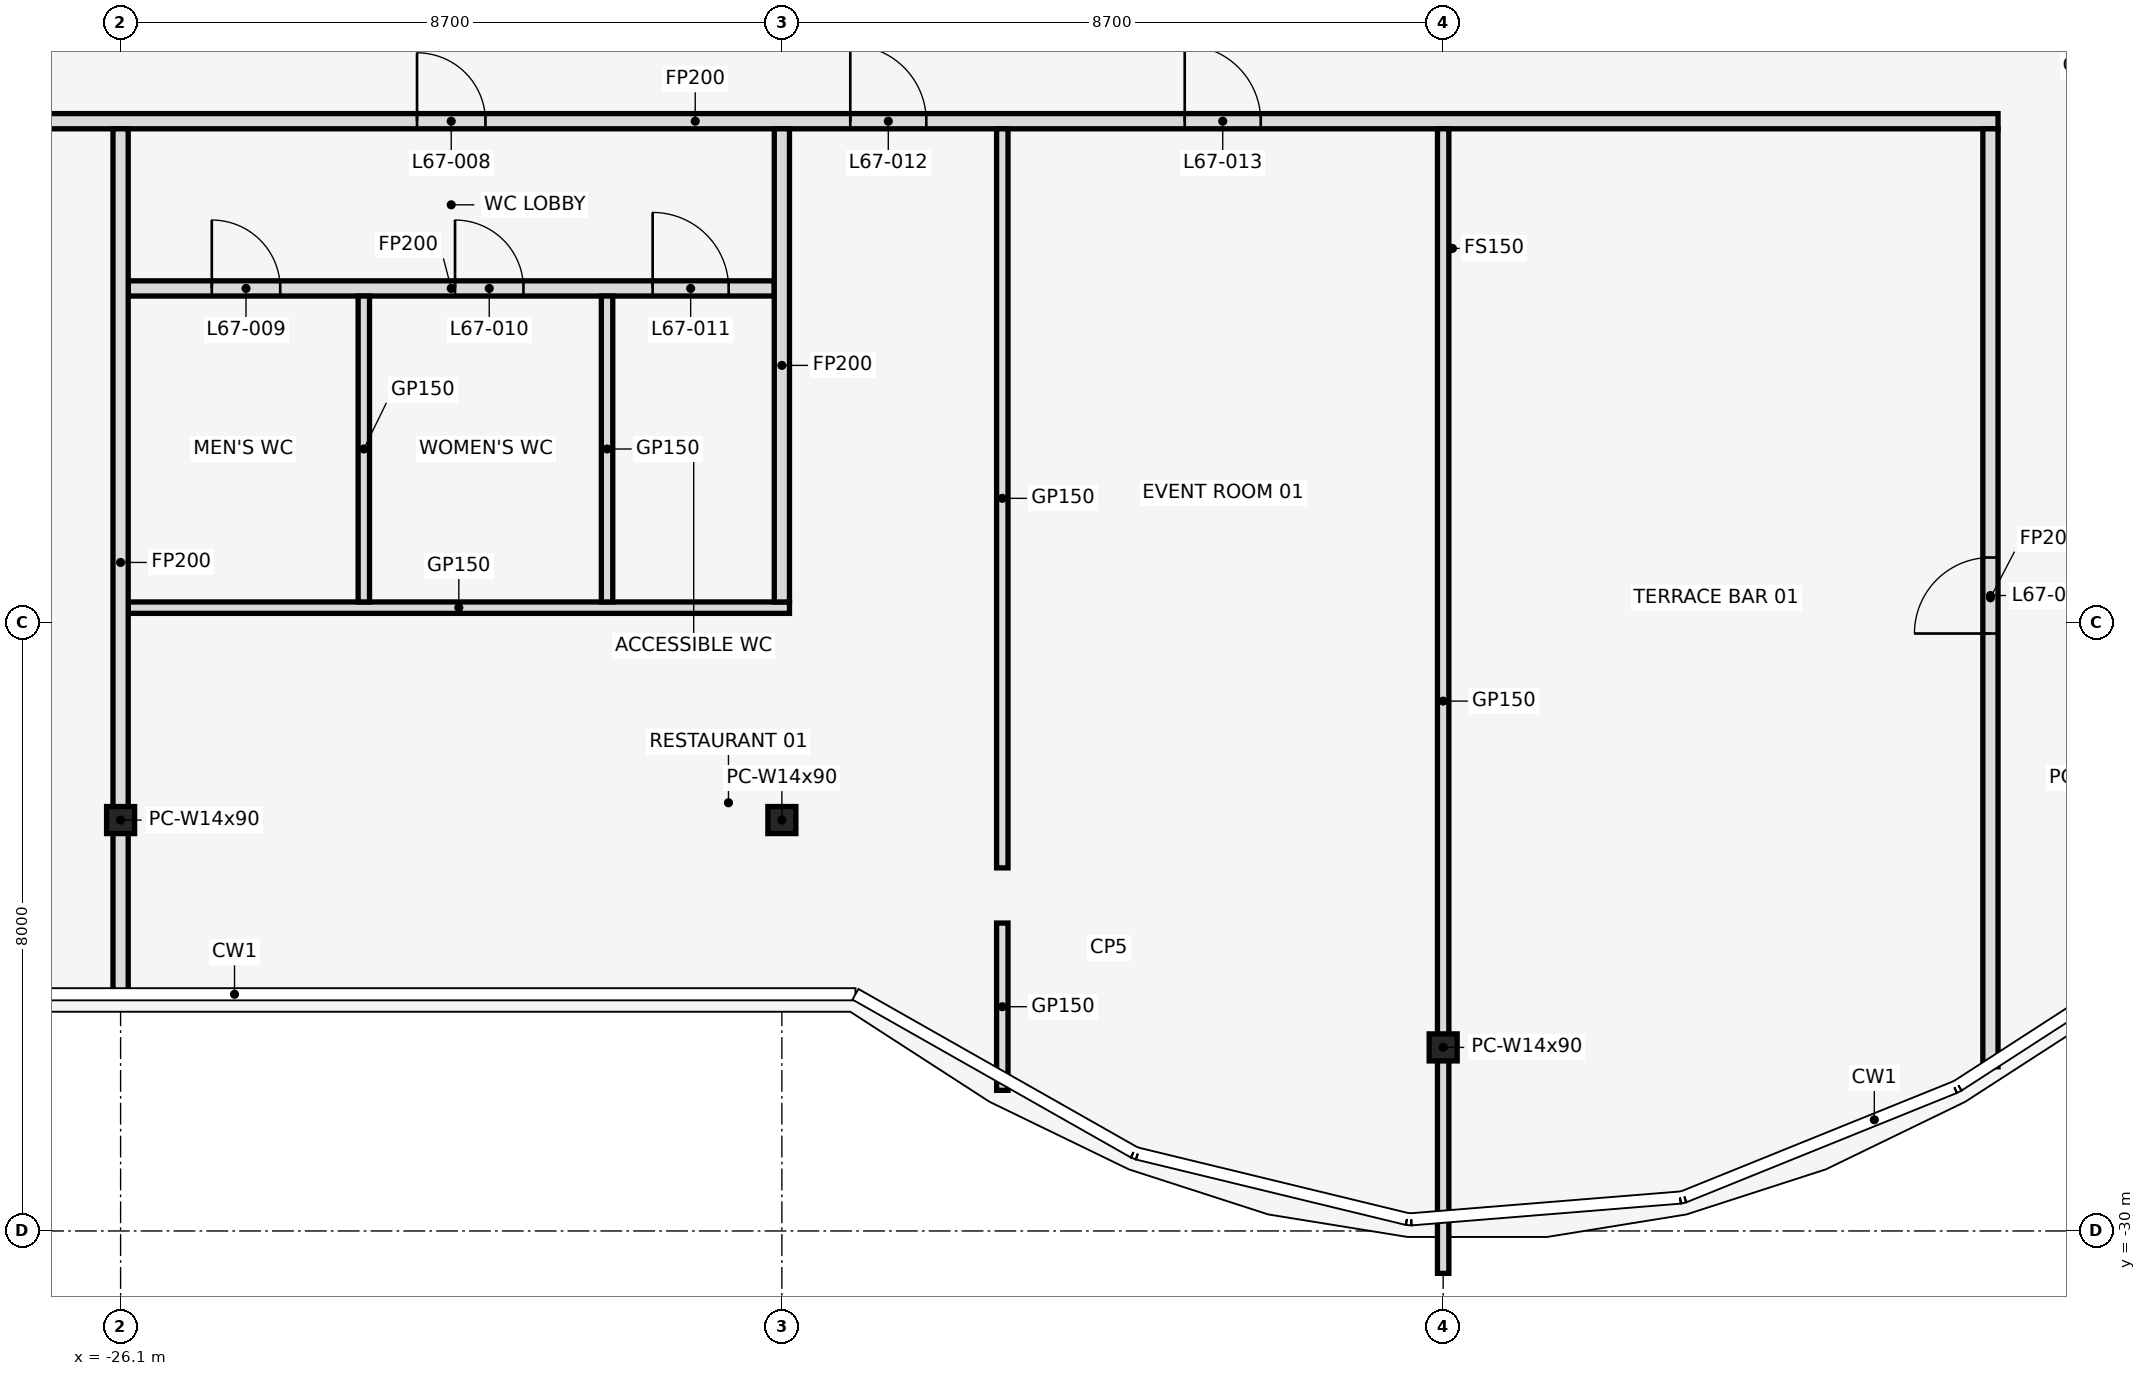
"""IFC4 building model, lengths in metres.
Left out: names, types, materials, properties, quantities, classifications, styles, units other than length and angle.
Written with IfcOpenShell. Run it as: python <this file> out.ifc"""

import sys

from ifc_helpers import new_model, si_unit, direction, frame, frame_2d, origin, origin_2d, place, context, subcontext, project, spatial, rectangle, i_section, extrude, element, fill, save


model = new_model("IFC4")
c1 = context("Model", 3, precision=1e-05, world=origin(), true_north=direction((0.0, 1.0)))
c2 = subcontext(c1, "Body", "Model", "MODEL_VIEW")
j1 = project(units=[si_unit("LENGTHUNIT", "METRE"), si_unit("PLANEANGLEUNIT", "RADIAN")], contexts=[c1])
p1 = place(None, origin())
s1 = spatial("IfcSite", under=j1, at=p1, CompositionType="ELEMENT")
p2 = place(p1, origin())
s2 = spatial("IfcBuilding", under=s1, at=p2, CompositionType="ELEMENT")
p3 = place(p2, frame((0.0, 0.0, 297.5)))
s3 = spatial("IfcBuildingStorey", under=s2, at=p3, CompositionType="ELEMENT", Elevation=297.5)
for number, where, z_axis, x_axis in (
    (1, (-26.1, -24.594, 0.0), (0.0, 0.0, 1.0), (1.0, 0.0, 0.0)),
    (2, (-17.4, -24.594, 0.0), (0.0, 0.0, 1.0), (1.0, 0.0, 0.0)),
    (3, (-8.7, -27.585, 0.0), (0.0, 0.0, 1.0), (1.0, 0.0, 0.0)),
):
    element("IfcColumn", number, at=place(p3, frame(where, z_axis=z_axis, x_axis=x_axis)), inside=s3, PredefinedType="COLUMN", context=c2, shape_type="SweptSolid", body=[
        extrude(i_section(OverallWidth=0.368, OverallDepth=0.356, WebThickness=0.011, FlangeThickness=0.018, at=origin_2d()), origin(), (0.0, 0.0, 1.0), 4.5),
    ])
p4 = place(p3, frame((-26.0, -21.8, 0.0), z_axis=(0.0, 0.0, 1.0), x_axis=(1.0, 0.0, 0.0)))
e4 = element("IfcWall", 4, at=p4, inside=s3, PredefinedType="PARTITIONING", context=c2, shape_type="SweptSolid", body=[
    extrude(rectangle(XDim=8.7, YDim=0.15, at=frame_2d((4.35, 0.0))), origin(), (0.0, 0.0, 1.0), 3.418),
])
p5 = place(p3, frame((-26.0, -17.6, 0.0), z_axis=(0.0, 0.0, 1.0), x_axis=(1.0, 0.0, 0.0)))
e5 = element("IfcWall", 5, at=p5, inside=s3, PredefinedType="PARTITIONING", context=c2, shape_type="SweptSolid", body=[
    extrude(rectangle(XDim=8.5, YDim=0.2, at=frame_2d((4.25, 0.0))), origin(), (0.0, 0.0, 1.0), 3.418),
])
p6 = place(p5, frame((1.1, 0.0, 0.0)))
e6 = element("IfcOpeningElement", 6, at=p6, cuts=e5, PredefinedType="OPENING", context=c2, shape_type="SweptSolid", body=[
    extrude(rectangle(XDim=0.9, YDim=2.1, at=frame_2d((0.45, 1.05))), frame((0.0, 0.112, 0.0), z_axis=(0.0, -1.0, 0.0), x_axis=(1.0, 0.0, 0.0)), (0.0, 0.0, 1.0), 0.224),
])
p7 = place(p5, frame((4.3, 0.0, 0.0)))
e7 = element("IfcOpeningElement", 7, at=p7, cuts=e5, PredefinedType="OPENING", context=c2, shape_type="SweptSolid", body=[
    extrude(rectangle(XDim=0.9, YDim=2.1, at=frame_2d((0.45, 1.05))), frame((0.0, 0.112, 0.0), z_axis=(0.0, -1.0, 0.0), x_axis=(1.0, 0.0, 0.0)), (0.0, 0.0, 1.0), 0.224),
])
p8 = place(p5, frame((6.9, 0.0, 0.0)))
e8 = element("IfcOpeningElement", 8, at=p8, cuts=e5, PredefinedType="OPENING", context=c2, shape_type="SweptSolid", body=[
    extrude(rectangle(XDim=1.0, YDim=2.1, at=frame_2d((0.5, 1.05))), frame((0.0, 0.112, 0.0), z_axis=(0.0, -1.0, 0.0), x_axis=(1.0, 0.0, 0.0)), (0.0, 0.0, 1.0), 0.224),
])
p9 = place(p3, frame((-35.68, -15.4, 0.0), z_axis=(0.0, 0.0, 1.0), x_axis=(1.0, 0.0, 0.0)))
e9 = element("IfcWall", 9, at=p9, inside=s3, PredefinedType="PARTITIONING", context=c2, shape_type="SweptSolid", body=[
    extrude(rectangle(XDim=34.28, YDim=0.2, at=frame_2d((17.14, 0.0))), origin(), (0.0, 0.0, 1.0), 3.418),
])
p10 = place(p9, frame((4.3, 0.0, 0.0)))
e10 = element("IfcOpeningElement", 10, at=p10, cuts=e9, PredefinedType="OPENING", context=c2, shape_type="SweptSolid", body=[
    extrude(rectangle(XDim=1.0, YDim=2.1, at=frame_2d((0.5, 1.05))), frame((0.0, 0.112, 0.0), z_axis=(0.0, -1.0, 0.0), x_axis=(1.0, 0.0, 0.0)), (0.0, 0.0, 1.0), 0.224),
])
p11 = place(p9, frame((13.48, 0.0, 0.0)))
e11 = element("IfcOpeningElement", 11, at=p11, cuts=e9, PredefinedType="OPENING", context=c2, shape_type="SweptSolid", body=[
    extrude(rectangle(XDim=0.9, YDim=2.1, at=frame_2d((0.45, 1.05))), frame((0.0, 0.112, 0.0), z_axis=(0.0, -1.0, 0.0), x_axis=(1.0, 0.0, 0.0)), (0.0, 0.0, 1.0), 0.224),
])
p12 = place(p9, frame((19.18, 0.0, 0.0)))
e12 = element("IfcOpeningElement", 12, at=p12, cuts=e9, PredefinedType="OPENING", context=c2, shape_type="SweptSolid", body=[
    extrude(rectangle(XDim=1.0, YDim=2.1, at=frame_2d((0.5, 1.05))), frame((0.0, 0.112, 0.0), z_axis=(0.0, -1.0, 0.0), x_axis=(1.0, 0.0, 0.0)), (0.0, 0.0, 1.0), 0.224),
])
p13 = place(p9, frame((23.58, 0.0, 0.0)))
e13 = element("IfcOpeningElement", 13, at=p13, cuts=e9, PredefinedType="OPENING", context=c2, shape_type="SweptSolid", body=[
    extrude(rectangle(XDim=1.0, YDim=2.1, at=frame_2d((0.5, 1.05))), frame((0.0, 0.112, 0.0), z_axis=(0.0, -1.0, 0.0), x_axis=(1.0, 0.0, 0.0)), (0.0, 0.0, 1.0), 0.224),
])
p14 = place(p3, frame((-26.1, -26.91, 0.0), z_axis=(0.0, 0.0, 1.0), x_axis=(0.0, 1.0, 0.0)))
e14 = element("IfcWall", 14, at=p14, inside=s3, PredefinedType="PARTITIONING", context=c2, shape_type="SweptSolid", body=[
    extrude(rectangle(XDim=11.41, YDim=0.2, at=frame_2d((5.705, 0.0))), origin(), (0.0, 0.0, 1.0), 3.418),
])
for number, where, z_axis, x_axis in (
    (15, (-22.9, -21.725, 0.0), (0.0, 0.0, 1.0), (0.0, 1.0, 0.0)),
    (16, (-19.7, -21.725, 0.0), (0.0, 0.0, 1.0), (0.0, 1.0, 0.0)),
):
    element("IfcWall", number, at=place(p3, frame(where, z_axis=z_axis, x_axis=x_axis)), inside=s3, PredefinedType="PARTITIONING", context=c2, shape_type="SweptSolid", body=[
        extrude(rectangle(XDim=4.025, YDim=0.15, at=frame_2d((2.013, 0.0))), origin(), (0.0, 0.0, 1.0), 3.418),
    ])
p15 = place(p3, frame((-17.4, -21.725, 0.0), z_axis=(0.0, 0.0, 1.0), x_axis=(0.0, 1.0, 0.0)))
e17 = element("IfcWall", 17, at=p15, inside=s3, PredefinedType="PARTITIONING", context=c2, shape_type="SweptSolid", body=[
    extrude(rectangle(XDim=6.225, YDim=0.2, at=frame_2d((3.113, 0.0))), origin(), (0.0, 0.0, 1.0), 3.418),
])
p16 = place(p3, frame((-14.5, -28.15, 0.0), z_axis=(0.0, 0.0, 1.0), x_axis=(0.0, 1.0, 0.0)))
e18 = element("IfcWall", 18, at=p16, inside=s3, PredefinedType="PARTITIONING", context=c2, shape_type="SweptSolid", body=[
    extrude(rectangle(XDim=2.201, YDim=0.15, at=frame_2d((1.101, 0.0))), origin(), (0.0, 0.0, 1.0), 3.418),
])
p17 = place(p3, frame((-14.5, -25.223, 0.0), z_axis=(0.0, 0.0, 1.0), x_axis=(0.0, 1.0, 0.0)))
e19 = element("IfcWall", 19, at=p17, inside=s3, PredefinedType="PARTITIONING", context=c2, shape_type="SweptSolid", body=[
    extrude(rectangle(XDim=9.723, YDim=0.15, at=frame_2d((4.862, 0.0))), origin(), (0.0, 0.0, 1.0), 3.418),
])
p18 = place(p3, frame((-8.7, -30.558, 0.0), z_axis=(0.0, 0.0, 1.0), x_axis=(0.0, 1.0, 0.0)))
e20 = element("IfcWall", 20, at=p18, inside=s3, PredefinedType="PARTITIONING", context=c2, shape_type="SweptSolid", body=[
    extrude(rectangle(XDim=15.058, YDim=0.15, at=frame_2d((7.529, 0.0))), origin(), (0.0, 0.0, 1.0), 3.418),
])
p19 = place(p3, frame((-1.5, -27.84, 0.0), z_axis=(0.0, 0.0, 1.0), x_axis=(0.0, 1.0, 0.0)))
e21 = element("IfcWall", 21, at=p19, inside=s3, PredefinedType="PARTITIONING", context=c2, shape_type="SweptSolid", body=[
    extrude(rectangle(XDim=12.34, YDim=0.2, at=frame_2d((6.17, 0.0))), origin(), (0.0, 0.0, 1.0), 3.418),
])
p20 = place(p19, frame((5.7, 0.0, 0.0)))
e22 = element("IfcOpeningElement", 22, at=p20, cuts=e21, PredefinedType="OPENING", context=c2, shape_type="SweptSolid", body=[
    extrude(rectangle(XDim=1.0, YDim=2.1, at=frame_2d((0.5, 1.05))), frame((0.0, 0.112, 0.0), z_axis=(0.0, -1.0, 0.0), x_axis=(1.0, 0.0, 0.0)), (0.0, 0.0, 1.0), 0.224),
])
p21 = place(p11, frame((0.9, 0.0, 0.0), z_axis=(0.0, 0.0, 1.0), x_axis=(-1.0, 0.0, 0.0)))
e23 = element("IfcDoor", 23, at=p21, inside=s3, OperationType="SINGLE_SWING_RIGHT", PredefinedType="DOOR", context=c2, shape_type="SweptSolid", body=[
    extrude(rectangle(XDim=0.9, YDim=2.1, at=frame_2d((0.45, 1.05))), frame((0.0, 0.025, 0.0), z_axis=(0.0, -1.0, 0.0), x_axis=(1.0, 0.0, 0.0)), (0.0, 0.0, 1.0), 0.05),
])
fill(e11, e23)
p22 = place(p6, frame((0.9, 0.0, 0.0), z_axis=(0.0, 0.0, 1.0), x_axis=(-1.0, 0.0, 0.0)))
e24 = element("IfcDoor", 24, at=p22, inside=s3, OperationType="SINGLE_SWING_RIGHT", PredefinedType="DOOR", context=c2, shape_type="SweptSolid", body=[
    extrude(rectangle(XDim=0.9, YDim=2.1, at=frame_2d((0.45, 1.05))), frame((0.0, 0.025, 0.0), z_axis=(0.0, -1.0, 0.0), x_axis=(1.0, 0.0, 0.0)), (0.0, 0.0, 1.0), 0.05),
])
fill(e6, e24)
p23 = place(p7, frame((0.9, 0.0, 0.0), z_axis=(0.0, 0.0, 1.0), x_axis=(-1.0, 0.0, 0.0)))
e25 = element("IfcDoor", 25, at=p23, inside=s3, OperationType="SINGLE_SWING_LEFT", PredefinedType="DOOR", context=c2, shape_type="SweptSolid", body=[
    extrude(rectangle(XDim=0.9, YDim=2.1, at=frame_2d((0.45, 1.05))), frame((0.0, 0.025, 0.0), z_axis=(0.0, -1.0, 0.0), x_axis=(1.0, 0.0, 0.0)), (0.0, 0.0, 1.0), 0.05),
])
fill(e7, e25)
p24 = place(p8, frame((1.0, 0.0, 0.0), z_axis=(0.0, 0.0, 1.0), x_axis=(-1.0, 0.0, 0.0)))
e26 = element("IfcDoor", 26, at=p24, inside=s3, OperationType="SINGLE_SWING_RIGHT", PredefinedType="DOOR", context=c2, shape_type="SweptSolid", body=[
    extrude(rectangle(XDim=1.0, YDim=2.1, at=frame_2d((0.5, 1.05))), frame((0.0, 0.025, 0.0), z_axis=(0.0, -1.0, 0.0), x_axis=(1.0, 0.0, 0.0)), (0.0, 0.0, 1.0), 0.05),
])
fill(e8, e26)
p25 = place(p12, frame((1.0, 0.0, 0.0), z_axis=(0.0, 0.0, 1.0), x_axis=(-1.0, 0.0, 0.0)))
e27 = element("IfcDoor", 27, at=p25, inside=s3, OperationType="SINGLE_SWING_RIGHT", PredefinedType="DOOR", context=c2, shape_type="SweptSolid", body=[
    extrude(rectangle(XDim=1.0, YDim=2.1, at=frame_2d((0.5, 1.05))), frame((0.0, 0.025, 0.0), z_axis=(0.0, -1.0, 0.0), x_axis=(1.0, 0.0, 0.0)), (0.0, 0.0, 1.0), 0.05),
])
fill(e12, e27)
p26 = place(p13, frame((1.0, 0.0, 0.0), z_axis=(0.0, 0.0, 1.0), x_axis=(-1.0, 0.0, 0.0)))
e28 = element("IfcDoor", 28, at=p26, inside=s3, OperationType="SINGLE_SWING_LEFT", PredefinedType="DOOR", context=c2, shape_type="SweptSolid", body=[
    extrude(rectangle(XDim=1.0, YDim=2.1, at=frame_2d((0.5, 1.05))), frame((0.0, 0.025, 0.0), z_axis=(0.0, -1.0, 0.0), x_axis=(1.0, 0.0, 0.0)), (0.0, 0.0, 1.0), 0.05),
])
fill(e13, e28)
p27 = place(p20, origin())
e29 = element("IfcDoor", 29, at=p27, inside=s3, OperationType="SINGLE_SWING_LEFT", PredefinedType="DOOR", context=c2, shape_type="SweptSolid", body=[
    extrude(rectangle(XDim=1.0, YDim=2.1, at=frame_2d((0.5, 1.05))), frame((0.0, 0.025, 0.0), z_axis=(0.0, -1.0, 0.0), x_axis=(1.0, 0.0, 0.0)), (0.0, 0.0, 1.0), 0.05),
])
fill(e22, e29)
save(model, sys.argv[1])
